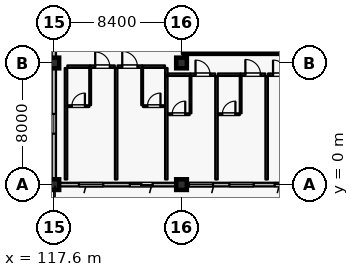
"""IFC4 building model, lengths in metres.
Left out: names, types, materials, properties, quantities, classifications, styles, units other than length and angle.
Written with IfcOpenShell. Run it as: python <this file> out.ifc"""

import sys

from ifc_helpers import new_model, si_unit, direction, frame, frame_2d, origin, origin_2d, place, context, subcontext, project, spatial, rectangle, hollow_rectangle, extrude, element, fill, save


model = new_model("IFC4")
c1 = context("Model", 3, precision=1e-05, world=origin(), true_north=direction((0.0, 1.0)))
c2 = subcontext(c1, "Body", "Model", "MODEL_VIEW")
j1 = project(units=[si_unit("LENGTHUNIT", "METRE"), si_unit("PLANEANGLEUNIT", "RADIAN")], contexts=[c1])
p1 = place(None, origin())
s1 = spatial("IfcSite", under=j1, at=p1, CompositionType="ELEMENT")
p2 = place(p1, origin())
s2 = spatial("IfcBuilding", under=s1, at=p2, CompositionType="ELEMENT")
p3 = place(p2, frame((0.0, 0.0, 28.8)))
s3 = spatial("IfcBuildingStorey", under=s2, at=p3, CompositionType="ELEMENT", Elevation=28.8)
for number, where, z_axis, x_axis in (
    (1, (117.6, 0.0, 0.0), (0.0, 0.0, 1.0), (1.0, 0.0, 0.0)),
    (2, (126.0, 0.0, 0.0), (0.0, 0.0, 1.0), (1.0, 0.0, 0.0)),
    (3, (117.6, 8.0, 0.0), (0.0, 0.0, 1.0), (1.0, 0.0, 0.0)),
    (4, (126.0, 8.0, 0.0), (0.0, 0.0, 1.0), (1.0, 0.0, 0.0)),
):
    element("IfcColumn", number, at=place(p3, frame(where, z_axis=z_axis, x_axis=x_axis)), inside=s3, PredefinedType="COLUMN", context=c2, shape_type="SweptSolid", body=[
        extrude(rectangle(XDim=0.7, YDim=0.7, at=origin_2d()), origin(), (0.0, 0.0, 1.0), 3.6),
    ])
p4 = place(p3, frame((125.65, 0.0, 0.0), z_axis=(0.0, 0.0, 1.0), x_axis=(-1.0, 0.0, 0.0)))
e5 = element("IfcWall", 5, at=p4, inside=s3, PredefinedType="SOLIDWALL", context=c2, shape_type="SweptSolid", body=[
    extrude(rectangle(XDim=7.7, YDim=0.24, at=frame_2d((3.85, 0.0))), origin(), (0.0, 0.0, 1.0), 2.93),
])
p5 = place(p4, frame((1.55, 0.0, 0.0)))
e6 = element("IfcOpeningElement", 6, at=p5, cuts=e5, PredefinedType="OPENING", context=c2, shape_type="SweptSolid", body=[
    extrude(rectangle(XDim=1.5, YDim=2.25, at=frame_2d((0.75, 1.125))), frame((0.0, 0.13, 0.0), z_axis=(0.0, -1.0, 0.0), x_axis=(1.0, 0.0, 0.0)), (0.0, 0.0, 1.0), 0.26),
])
p6 = place(p4, frame((4.8, 0.0, 0.8)))
e7 = element("IfcOpeningElement", 7, at=p6, cuts=e5, PredefinedType="OPENING", context=c2, shape_type="SweptSolid", body=[
    extrude(rectangle(XDim=1.6, YDim=1.6, at=frame_2d((0.8, 0.8))), frame((0.0, 0.13, 0.0), z_axis=(0.0, -1.0, 0.0), x_axis=(1.0, 0.0, 0.0)), (0.0, 0.0, 1.0), 0.26),
])
p7 = place(p3, frame((134.05, 0.0, 0.0), z_axis=(0.0, 0.0, 1.0), x_axis=(-1.0, 0.0, 0.0)))
e8 = element("IfcWall", 8, at=p7, inside=s3, PredefinedType="SOLIDWALL", context=c2, shape_type="SweptSolid", body=[
    extrude(rectangle(XDim=7.7, YDim=0.24, at=frame_2d((3.85, 0.0))), origin(), (0.0, 0.0, 1.0), 2.93),
])
p8 = place(p7, frame((0.425, 0.0, 0.0)))
e9 = element("IfcOpeningElement", 9, at=p8, cuts=e8, PredefinedType="OPENING", context=c2, shape_type="SweptSolid", body=[
    extrude(rectangle(XDim=1.5, YDim=2.25, at=frame_2d((0.75, 1.125))), frame((0.0, 0.13, 0.0), z_axis=(0.0, -1.0, 0.0), x_axis=(1.0, 0.0, 0.0)), (0.0, 0.0, 1.0), 0.26),
])
p9 = place(p7, frame((3.3, 0.0, 0.8)))
e10 = element("IfcOpeningElement", 10, at=p9, cuts=e8, PredefinedType="OPENING", context=c2, shape_type="SweptSolid", body=[
    extrude(rectangle(XDim=1.6, YDim=1.6, at=frame_2d((0.8, 0.8))), frame((0.0, 0.13, 0.0), z_axis=(0.0, -1.0, 0.0), x_axis=(1.0, 0.0, 0.0)), (0.0, 0.0, 1.0), 0.26),
])
p10 = place(p7, frame((5.975, 0.0, 0.8)))
e11 = element("IfcOpeningElement", 11, at=p10, cuts=e8, PredefinedType="OPENING", context=c2, shape_type="SweptSolid", body=[
    extrude(rectangle(XDim=1.6, YDim=1.6, at=frame_2d((0.8, 0.8))), frame((0.0, 0.13, 0.0), z_axis=(0.0, -1.0, 0.0), x_axis=(1.0, 0.0, 0.0)), (0.0, 0.0, 1.0), 0.26),
])
p11 = place(p3, frame((117.6, 0.35, 0.0), z_axis=(0.0, 0.0, 1.0), x_axis=(0.0, 1.0, 0.0)))
e12 = element("IfcWall", 12, at=p11, inside=s3, PredefinedType="SOLIDWALL", context=c2, shape_type="SweptSolid", body=[
    extrude(rectangle(XDim=7.3, YDim=0.28, at=frame_2d((3.65, 0.0))), origin(), (0.0, 0.0, 1.0), 2.7),
])
p12 = place(p11, frame((3.0, 0.0, 0.5)))
e13 = element("IfcOpeningElement", 13, at=p12, cuts=e12, PredefinedType="OPENING", context=c2, shape_type="SweptSolid", body=[
    extrude(rectangle(XDim=1.3, YDim=1.65, at=frame_2d((0.65, 0.825))), frame((0.0, 0.15, 0.0), z_axis=(0.0, -1.0, 0.0), x_axis=(1.0, 0.0, 0.0)), (0.0, 0.0, 1.0), 0.3),
])
p13 = place(p3, frame((117.6, 8.35, 0.0), z_axis=(0.0, 0.0, 1.0), x_axis=(0.0, 1.0, 0.0)))
e14 = element("IfcWall", 14, at=p13, inside=s3, PredefinedType="SOLIDWALL", context=c2, shape_type="SweptSolid", body=[
    extrude(rectangle(XDim=7.3, YDim=0.28, at=frame_2d((3.65, 0.0))), origin(), (0.0, 0.0, 1.0), 2.7),
])
p14 = place(p13, frame((3.0, 0.0, 0.5)))
e15 = element("IfcOpeningElement", 15, at=p14, cuts=e14, PredefinedType="OPENING", context=c2, shape_type="SweptSolid", body=[
    extrude(rectangle(XDim=1.3, YDim=1.65, at=frame_2d((0.65, 0.825))), frame((0.0, 0.15, 0.0), z_axis=(0.0, -1.0, 0.0), x_axis=(1.0, 0.0, 0.0)), (0.0, 0.0, 1.0), 0.3),
])
p15 = place(p3, frame((126.1, 8.8, 0.0), z_axis=(0.0, 0.0, 1.0), x_axis=(1.0, 0.0, 0.0)))
e16 = element("IfcWall", 16, at=p15, inside=s3, PredefinedType="SHEAR", context=c2, shape_type="SweptSolid", body=[
    extrude(rectangle(XDim=8.2, YDim=0.4, at=frame_2d((4.1, 0.0))), origin(), (0.0, 0.0, 1.0), 3.365),
])
for number, where, z_axis, x_axis in (
    (17, (126.48, 8.8, 0.0), (0.0, 0.0, 1.0), (1.0, 0.0, 0.0)),
    (18, (127.74, 8.8, 0.0), (0.0, 0.0, 1.0), (1.0, 0.0, 0.0)),
):
    element("IfcColumn", number, at=place(p3, frame(where, z_axis=z_axis, x_axis=x_axis)), inside=s3, PredefinedType="COLUMN", context=c2, shape_type="SweptSolid", body=[
        extrude(hollow_rectangle(XDim=0.3, YDim=0.3, WallThickness=0.012, at=origin_2d()), origin(), (0.0, 0.0, 1.0), 3.42),
    ])
p16 = place(p3, frame((118.49, 7.76, 0.0), z_axis=(0.0, 0.0, 1.0), x_axis=(1.0, 0.0, 0.0)))
e19 = element("IfcWall", 19, at=p16, inside=s3, PredefinedType="PARTITIONING", context=c2, shape_type="SweptSolid", body=[
    extrude(rectangle(XDim=1.49, YDim=0.16, at=frame_2d((0.745, 0.0))), origin(), (0.0, 0.0, 1.0), 3.365),
])
p17 = place(p3, frame((119.99, 7.76, 0.0), z_axis=(0.0, 0.0, 1.0), x_axis=(1.0, 0.0, 0.0)))
e20 = element("IfcWall", 20, at=p17, inside=s3, PredefinedType="PARTITIONING", context=c2, shape_type="SweptSolid", body=[
    extrude(rectangle(XDim=1.62, YDim=0.16, at=frame_2d((0.81, 0.0))), origin(), (0.0, 0.0, 1.0), 3.365),
])
p18 = place(p17, frame((0.33, 0.0, 0.0)))
e21 = element("IfcOpeningElement", 21, at=p18, cuts=e20, PredefinedType="OPENING", context=c2, shape_type="SweptSolid", body=[
    extrude(rectangle(XDim=0.96, YDim=2.2, at=frame_2d((0.48, 1.1))), frame((0.0, 0.09, 0.0), z_axis=(0.0, -1.0, 0.0), x_axis=(1.0, 0.0, 0.0)), (0.0, 0.0, 1.0), 0.18),
])
p19 = place(p3, frame((119.99, 5.22, 0.0), z_axis=(0.0, 0.0, 1.0), x_axis=(0.0, 1.0, 0.0)))
e22 = element("IfcWall", 22, at=p19, inside=s3, PredefinedType="PARTITIONING", context=c2, shape_type="SweptSolid", body=[
    extrude(rectangle(XDim=2.45, YDim=0.115, at=frame_2d((1.225, 0.0))), origin(), (0.0, 0.0, 1.0), 3.365),
])
p20 = place(p3, frame((118.5, 5.16, 0.0), z_axis=(0.0, 0.0, 1.0), x_axis=(1.0, 0.0, 0.0)))
e23 = element("IfcWall", 23, at=p20, inside=s3, PredefinedType="PARTITIONING", context=c2, shape_type="SweptSolid", body=[
    extrude(rectangle(XDim=1.43, YDim=0.115, at=frame_2d((0.715, 0.0))), origin(), (0.0, 0.0, 1.0), 3.365),
])
p21 = place(p20, frame((0.285, 0.0, 0.0)))
e24 = element("IfcOpeningElement", 24, at=p21, cuts=e23, PredefinedType="OPENING", context=c2, shape_type="SweptSolid", body=[
    extrude(rectangle(XDim=0.86, YDim=2.12, at=frame_2d((0.43, 1.06))), frame((0.0, 0.067, 0.0), z_axis=(0.0, -1.0, 0.0), x_axis=(1.0, 0.0, 0.0)), (0.0, 0.0, 1.0), 0.135),
])
p22 = place(p3, frame((118.4, 0.34, 0.0), z_axis=(0.0, 0.0, 1.0), x_axis=(0.0, 1.0, 0.0)))
e25 = element("IfcWall", 25, at=p22, inside=s3, PredefinedType="PARTITIONING", context=c2, shape_type="SweptSolid", body=[
    extrude(rectangle(XDim=7.33, YDim=0.16, at=frame_2d((3.665, 0.0))), origin(), (0.0, 0.0, 1.0), 3.365),
])
p23 = place(p3, frame((121.79, 7.76, 0.0), z_axis=(0.0, 0.0, 1.0), x_axis=(1.0, 0.0, 0.0)))
e26 = element("IfcWall", 26, at=p23, inside=s3, PredefinedType="PARTITIONING", context=c2, shape_type="SweptSolid", body=[
    extrude(rectangle(XDim=1.62, YDim=0.16, at=frame_2d((0.81, 0.0))), origin(), (0.0, 0.0, 1.0), 3.365),
])
p24 = place(p23, frame((0.31, 0.0, 0.0)))
e27 = element("IfcOpeningElement", 27, at=p24, cuts=e26, PredefinedType="OPENING", context=c2, shape_type="SweptSolid", body=[
    extrude(rectangle(XDim=1.0, YDim=2.25, at=frame_2d((0.5, 1.125))), frame((0.0, 0.09, 0.0), z_axis=(0.0, -1.0, 0.0), x_axis=(1.0, 0.0, 0.0)), (0.0, 0.0, 1.0), 0.18),
])
p25 = place(p3, frame((123.42, 7.76, 0.0), z_axis=(0.0, 0.0, 1.0), x_axis=(1.0, 0.0, 0.0)))
e28 = element("IfcWall", 28, at=p25, inside=s3, PredefinedType="PARTITIONING", context=c2, shape_type="SweptSolid", body=[
    extrude(rectangle(XDim=1.49, YDim=0.16, at=frame_2d((0.745, 0.0))), origin(), (0.0, 0.0, 1.0), 3.365),
])
p26 = place(p3, frame((123.41, 5.22, 0.0), z_axis=(0.0, 0.0, 1.0), x_axis=(0.0, 1.0, 0.0)))
e29 = element("IfcWall", 29, at=p26, inside=s3, PredefinedType="PARTITIONING", context=c2, shape_type="SweptSolid", body=[
    extrude(rectangle(XDim=2.45, YDim=0.115, at=frame_2d((1.225, 0.0))), origin(), (0.0, 0.0, 1.0), 3.365),
])
p27 = place(p3, frame((123.47, 5.16, 0.0), z_axis=(0.0, 0.0, 1.0), x_axis=(1.0, 0.0, 0.0)))
e30 = element("IfcWall", 30, at=p27, inside=s3, PredefinedType="PARTITIONING", context=c2, shape_type="SweptSolid", body=[
    extrude(rectangle(XDim=1.43, YDim=0.115, at=frame_2d((0.715, 0.0))), origin(), (0.0, 0.0, 1.0), 3.365),
])
p28 = place(p27, frame((0.285, 0.0, 0.0)))
e31 = element("IfcOpeningElement", 31, at=p28, cuts=e30, PredefinedType="OPENING", context=c2, shape_type="SweptSolid", body=[
    extrude(rectangle(XDim=0.86, YDim=2.12, at=frame_2d((0.43, 1.06))), frame((0.0, 0.067, 0.0), z_axis=(0.0, -1.0, 0.0), x_axis=(1.0, 0.0, 0.0)), (0.0, 0.0, 1.0), 0.135),
])
p29 = place(p3, frame((121.7, 0.34, 0.0), z_axis=(0.0, 0.0, 1.0), x_axis=(0.0, 1.0, 0.0)))
e32 = element("IfcWall", 32, at=p29, inside=s3, PredefinedType="PARTITIONING", context=c2, shape_type="SweptSolid", body=[
    extrude(rectangle(XDim=7.33, YDim=0.16, at=frame_2d((3.665, 0.0))), origin(), (0.0, 0.0, 1.0), 3.365),
])
p30 = place(p3, frame((125.0, 7.15, 0.0), z_axis=(0.0, 0.0, 1.0), x_axis=(0.0, 1.0, 0.0)))
e33 = element("IfcWall", 33, at=p30, inside=s3, PredefinedType="PARTITIONING", context=c2, shape_type="SweptSolid", body=[
    extrude(rectangle(XDim=0.52, YDim=0.16, at=frame_2d((0.26, 0.0))), origin(), (0.0, 0.0, 1.0), 3.365),
])
p31 = place(p3, frame((125.09, 7.23, 0.0), z_axis=(0.0, 0.0, 1.0), x_axis=(1.0, 0.0, 0.0)))
e34 = element("IfcWall", 34, at=p31, inside=s3, PredefinedType="PARTITIONING", context=c2, shape_type="SweptSolid", body=[
    extrude(rectangle(XDim=1.49, YDim=0.16, at=frame_2d((0.745, 0.0))), origin(), (0.0, 0.0, 1.0), 3.365),
])
p32 = place(p3, frame((126.59, 7.23, 0.0), z_axis=(0.0, 0.0, 1.0), x_axis=(1.0, 0.0, 0.0)))
e35 = element("IfcWall", 35, at=p32, inside=s3, PredefinedType="PARTITIONING", context=c2, shape_type="SweptSolid", body=[
    extrude(rectangle(XDim=1.62, YDim=0.16, at=frame_2d((0.81, 0.0))), origin(), (0.0, 0.0, 1.0), 3.365),
])
p33 = place(p32, frame((0.33, 0.0, 0.0)))
e36 = element("IfcOpeningElement", 36, at=p33, cuts=e35, PredefinedType="OPENING", context=c2, shape_type="SweptSolid", body=[
    extrude(rectangle(XDim=0.96, YDim=2.2, at=frame_2d((0.48, 1.1))), frame((0.0, 0.09, 0.0), z_axis=(0.0, -1.0, 0.0), x_axis=(1.0, 0.0, 0.0)), (0.0, 0.0, 1.0), 0.18),
])
p34 = place(p3, frame((126.59, 4.69, 0.0), z_axis=(0.0, 0.0, 1.0), x_axis=(0.0, 1.0, 0.0)))
e37 = element("IfcWall", 37, at=p34, inside=s3, PredefinedType="PARTITIONING", context=c2, shape_type="SweptSolid", body=[
    extrude(rectangle(XDim=2.45, YDim=0.115, at=frame_2d((1.225, 0.0))), origin(), (0.0, 0.0, 1.0), 3.365),
])
p35 = place(p3, frame((125.1, 4.63, 0.0), z_axis=(0.0, 0.0, 1.0), x_axis=(1.0, 0.0, 0.0)))
e38 = element("IfcWall", 38, at=p35, inside=s3, PredefinedType="PARTITIONING", context=c2, shape_type="SweptSolid", body=[
    extrude(rectangle(XDim=1.43, YDim=0.115, at=frame_2d((0.715, 0.0))), origin(), (0.0, 0.0, 1.0), 3.365),
])
p36 = place(p35, frame((0.285, 0.0, 0.0)))
e39 = element("IfcOpeningElement", 39, at=p36, cuts=e38, PredefinedType="OPENING", context=c2, shape_type="SweptSolid", body=[
    extrude(rectangle(XDim=0.86, YDim=2.12, at=frame_2d((0.43, 1.06))), frame((0.0, 0.067, 0.0), z_axis=(0.0, -1.0, 0.0), x_axis=(1.0, 0.0, 0.0)), (0.0, 0.0, 1.0), 0.135),
])
p37 = place(p3, frame((125.0, 0.34, 0.0), z_axis=(0.0, 0.0, 1.0), x_axis=(0.0, 1.0, 0.0)))
e40 = element("IfcWall", 40, at=p37, inside=s3, PredefinedType="PARTITIONING", context=c2, shape_type="SweptSolid", body=[
    extrude(rectangle(XDim=6.8, YDim=0.16, at=frame_2d((3.4, 0.0))), origin(), (0.0, 0.0, 1.0), 3.365),
])
p38 = place(p3, frame((128.39, 7.23, 0.0), z_axis=(0.0, 0.0, 1.0), x_axis=(1.0, 0.0, 0.0)))
e41 = element("IfcWall", 41, at=p38, inside=s3, PredefinedType="PARTITIONING", context=c2, shape_type="SweptSolid", body=[
    extrude(rectangle(XDim=1.49, YDim=0.16, at=frame_2d((0.745, 0.0))), origin(), (0.0, 0.0, 1.0), 3.365),
])
p39 = place(p3, frame((129.89, 7.23, 0.0), z_axis=(0.0, 0.0, 1.0), x_axis=(1.0, 0.0, 0.0)))
e42 = element("IfcWall", 42, at=p39, inside=s3, PredefinedType="PARTITIONING", context=c2, shape_type="SweptSolid", body=[
    extrude(rectangle(XDim=1.62, YDim=0.16, at=frame_2d((0.81, 0.0))), origin(), (0.0, 0.0, 1.0), 3.365),
])
p40 = place(p39, frame((0.31, 0.0, 0.0)))
e43 = element("IfcOpeningElement", 43, at=p40, cuts=e42, PredefinedType="OPENING", context=c2, shape_type="SweptSolid", body=[
    extrude(rectangle(XDim=1.0, YDim=2.25, at=frame_2d((0.5, 1.125))), frame((0.0, 0.09, 0.0), z_axis=(0.0, -1.0, 0.0), x_axis=(1.0, 0.0, 0.0)), (0.0, 0.0, 1.0), 0.18),
])
p41 = place(p3, frame((129.89, 4.69, 0.0), z_axis=(0.0, 0.0, 1.0), x_axis=(0.0, 1.0, 0.0)))
e44 = element("IfcWall", 44, at=p41, inside=s3, PredefinedType="PARTITIONING", context=c2, shape_type="SweptSolid", body=[
    extrude(rectangle(XDim=2.45, YDim=0.115, at=frame_2d((1.225, 0.0))), origin(), (0.0, 0.0, 1.0), 3.365),
])
p42 = place(p3, frame((128.4, 4.63, 0.0), z_axis=(0.0, 0.0, 1.0), x_axis=(1.0, 0.0, 0.0)))
e45 = element("IfcWall", 45, at=p42, inside=s3, PredefinedType="PARTITIONING", context=c2, shape_type="SweptSolid", body=[
    extrude(rectangle(XDim=1.43, YDim=0.115, at=frame_2d((0.715, 0.0))), origin(), (0.0, 0.0, 1.0), 3.365),
])
p43 = place(p42, frame((0.285, 0.0, 0.0)))
e46 = element("IfcOpeningElement", 46, at=p43, cuts=e45, PredefinedType="OPENING", context=c2, shape_type="SweptSolid", body=[
    extrude(rectangle(XDim=0.86, YDim=2.12, at=frame_2d((0.43, 1.06))), frame((0.0, 0.067, 0.0), z_axis=(0.0, -1.0, 0.0), x_axis=(1.0, 0.0, 0.0)), (0.0, 0.0, 1.0), 0.135),
])
p44 = place(p3, frame((128.3, 0.34, 0.0), z_axis=(0.0, 0.0, 1.0), x_axis=(0.0, 1.0, 0.0)))
e47 = element("IfcWall", 47, at=p44, inside=s3, PredefinedType="PARTITIONING", context=c2, shape_type="SweptSolid", body=[
    extrude(rectangle(XDim=6.8, YDim=0.16, at=frame_2d((3.4, 0.0))), origin(), (0.0, 0.0, 1.0), 3.365),
])
p45 = place(p3, frame((131.69, 7.23, 0.0), z_axis=(0.0, 0.0, 1.0), x_axis=(1.0, 0.0, 0.0)))
e48 = element("IfcWall", 48, at=p45, inside=s3, PredefinedType="PARTITIONING", context=c2, shape_type="SweptSolid", body=[
    extrude(rectangle(XDim=1.62, YDim=0.16, at=frame_2d((0.81, 0.0))), origin(), (0.0, 0.0, 1.0), 3.365),
])
p46 = place(p45, frame((0.33, 0.0, 0.0)))
e49 = element("IfcOpeningElement", 49, at=p46, cuts=e48, PredefinedType="OPENING", context=c2, shape_type="SweptSolid", body=[
    extrude(rectangle(XDim=0.96, YDim=2.2, at=frame_2d((0.48, 1.1))), frame((0.0, 0.09, 0.0), z_axis=(0.0, -1.0, 0.0), x_axis=(1.0, 0.0, 0.0)), (0.0, 0.0, 1.0), 0.18),
])
p47 = place(p3, frame((131.6, 0.34, 0.0), z_axis=(0.0, 0.0, 1.0), x_axis=(0.0, 1.0, 0.0)))
e50 = element("IfcWall", 50, at=p47, inside=s3, PredefinedType="PARTITIONING", context=c2, shape_type="SweptSolid", body=[
    extrude(rectangle(XDim=6.8, YDim=0.16, at=frame_2d((3.4, 0.0))), origin(), (0.0, 0.0, 1.0), 3.365),
])
p48 = place(p5, origin())
e51 = element("IfcDoor", 51, at=p48, inside=s3, OperationType="SLIDING_TO_LEFT", PredefinedType="DOOR", context=c2, shape_type="SweptSolid", body=[
    extrude(rectangle(XDim=1.5, YDim=2.25, at=frame_2d((0.75, 1.125))), frame((0.0, 0.025, 0.0), z_axis=(0.0, -1.0, 0.0), x_axis=(1.0, 0.0, 0.0)), (0.0, 0.0, 1.0), 0.05),
])
fill(e6, e51)
p49 = place(p6, origin())
e52 = element("IfcWindow", 52, at=p49, inside=s3, PartitioningType="SINGLE_PANEL", PredefinedType="WINDOW", context=c2, shape_type="SweptSolid", body=[
    extrude(rectangle(XDim=1.6, YDim=1.6, at=frame_2d((0.8, 0.8))), frame((0.0, 0.03, 0.0), z_axis=(0.0, -1.0, 0.0), x_axis=(1.0, 0.0, 0.0)), (0.0, 0.0, 1.0), 0.06),
])
fill(e7, e52)
p50 = place(p8, origin())
e53 = element("IfcDoor", 53, at=p50, inside=s3, OperationType="SLIDING_TO_LEFT", PredefinedType="DOOR", context=c2, shape_type="SweptSolid", body=[
    extrude(rectangle(XDim=1.5, YDim=2.25, at=frame_2d((0.75, 1.125))), frame((0.0, 0.025, 0.0), z_axis=(0.0, -1.0, 0.0), x_axis=(1.0, 0.0, 0.0)), (0.0, 0.0, 1.0), 0.05),
])
fill(e9, e53)
p51 = place(p9, origin())
e54 = element("IfcWindow", 54, at=p51, inside=s3, PartitioningType="SINGLE_PANEL", PredefinedType="WINDOW", context=c2, shape_type="SweptSolid", body=[
    extrude(rectangle(XDim=1.6, YDim=1.6, at=frame_2d((0.8, 0.8))), frame((0.0, 0.03, 0.0), z_axis=(0.0, -1.0, 0.0), x_axis=(1.0, 0.0, 0.0)), (0.0, 0.0, 1.0), 0.06),
])
fill(e10, e54)
p52 = place(p10, origin())
e55 = element("IfcWindow", 55, at=p52, inside=s3, PartitioningType="SINGLE_PANEL", PredefinedType="WINDOW", context=c2, shape_type="SweptSolid", body=[
    extrude(rectangle(XDim=1.6, YDim=1.6, at=frame_2d((0.8, 0.8))), frame((0.0, 0.03, 0.0), z_axis=(0.0, -1.0, 0.0), x_axis=(1.0, 0.0, 0.0)), (0.0, 0.0, 1.0), 0.06),
])
fill(e11, e55)
p53 = place(p12, origin())
e56 = element("IfcWindow", 56, at=p53, inside=s3, PartitioningType="SINGLE_PANEL", PredefinedType="WINDOW", context=c2, shape_type="SweptSolid", body=[
    extrude(rectangle(XDim=1.3, YDim=1.65, at=frame_2d((0.65, 0.825))), frame((0.0, 0.03, 0.0), z_axis=(0.0, -1.0, 0.0), x_axis=(1.0, 0.0, 0.0)), (0.0, 0.0, 1.0), 0.06),
])
fill(e13, e56)
p54 = place(p18, origin())
e57 = element("IfcDoor", 57, at=p54, inside=s3, OperationType="SINGLE_SWING_LEFT", PredefinedType="DOOR", context=c2, shape_type="SweptSolid", body=[
    extrude(rectangle(XDim=0.96, YDim=2.2, at=frame_2d((0.48, 1.1))), frame((0.0, 0.025, 0.0), z_axis=(0.0, -1.0, 0.0), x_axis=(1.0, 0.0, 0.0)), (0.0, 0.0, 1.0), 0.05),
])
fill(e21, e57)
p55 = place(p21, origin())
e58 = element("IfcDoor", 58, at=p55, inside=s3, OperationType="SINGLE_SWING_RIGHT", PredefinedType="DOOR", context=c2, shape_type="SweptSolid", body=[
    extrude(rectangle(XDim=0.86, YDim=2.12, at=frame_2d((0.43, 1.06))), frame((0.0, 0.025, 0.0), z_axis=(0.0, -1.0, 0.0), x_axis=(1.0, 0.0, 0.0)), (0.0, 0.0, 1.0), 0.05),
])
fill(e24, e58)
p56 = place(p24, origin())
e59 = element("IfcDoor", 59, at=p56, inside=s3, OperationType="SINGLE_SWING_LEFT", PredefinedType="DOOR", context=c2, shape_type="SweptSolid", body=[
    extrude(rectangle(XDim=1.0, YDim=2.25, at=frame_2d((0.5, 1.125))), frame((0.0, 0.025, 0.0), z_axis=(0.0, -1.0, 0.0), x_axis=(1.0, 0.0, 0.0)), (0.0, 0.0, 1.0), 0.05),
])
fill(e27, e59)
p57 = place(p28, origin())
e60 = element("IfcDoor", 60, at=p57, inside=s3, OperationType="SINGLE_SWING_RIGHT", PredefinedType="DOOR", context=c2, shape_type="SweptSolid", body=[
    extrude(rectangle(XDim=0.86, YDim=2.12, at=frame_2d((0.43, 1.06))), frame((0.0, 0.025, 0.0), z_axis=(0.0, -1.0, 0.0), x_axis=(1.0, 0.0, 0.0)), (0.0, 0.0, 1.0), 0.05),
])
fill(e31, e60)
p58 = place(p33, origin())
e61 = element("IfcDoor", 61, at=p58, inside=s3, OperationType="SINGLE_SWING_LEFT", PredefinedType="DOOR", context=c2, shape_type="SweptSolid", body=[
    extrude(rectangle(XDim=0.96, YDim=2.2, at=frame_2d((0.48, 1.1))), frame((0.0, 0.025, 0.0), z_axis=(0.0, -1.0, 0.0), x_axis=(1.0, 0.0, 0.0)), (0.0, 0.0, 1.0), 0.05),
])
fill(e36, e61)
p59 = place(p36, origin())
e62 = element("IfcDoor", 62, at=p59, inside=s3, OperationType="SINGLE_SWING_RIGHT", PredefinedType="DOOR", context=c2, shape_type="SweptSolid", body=[
    extrude(rectangle(XDim=0.86, YDim=2.12, at=frame_2d((0.43, 1.06))), frame((0.0, 0.025, 0.0), z_axis=(0.0, -1.0, 0.0), x_axis=(1.0, 0.0, 0.0)), (0.0, 0.0, 1.0), 0.05),
])
fill(e39, e62)
p60 = place(p40, origin())
e63 = element("IfcDoor", 63, at=p60, inside=s3, OperationType="SINGLE_SWING_LEFT", PredefinedType="DOOR", context=c2, shape_type="SweptSolid", body=[
    extrude(rectangle(XDim=1.0, YDim=2.25, at=frame_2d((0.5, 1.125))), frame((0.0, 0.025, 0.0), z_axis=(0.0, -1.0, 0.0), x_axis=(1.0, 0.0, 0.0)), (0.0, 0.0, 1.0), 0.05),
])
fill(e43, e63)
p61 = place(p43, origin())
e64 = element("IfcDoor", 64, at=p61, inside=s3, OperationType="SINGLE_SWING_RIGHT", PredefinedType="DOOR", context=c2, shape_type="SweptSolid", body=[
    extrude(rectangle(XDim=0.86, YDim=2.12, at=frame_2d((0.43, 1.06))), frame((0.0, 0.025, 0.0), z_axis=(0.0, -1.0, 0.0), x_axis=(1.0, 0.0, 0.0)), (0.0, 0.0, 1.0), 0.05),
])
fill(e46, e64)
p62 = place(p46, origin())
e65 = element("IfcDoor", 65, at=p62, inside=s3, OperationType="SINGLE_SWING_LEFT", PredefinedType="DOOR", context=c2, shape_type="SweptSolid", body=[
    extrude(rectangle(XDim=0.96, YDim=2.2, at=frame_2d((0.48, 1.1))), frame((0.0, 0.025, 0.0), z_axis=(0.0, -1.0, 0.0), x_axis=(1.0, 0.0, 0.0)), (0.0, 0.0, 1.0), 0.05),
])
fill(e49, e65)
save(model, sys.argv[1])
